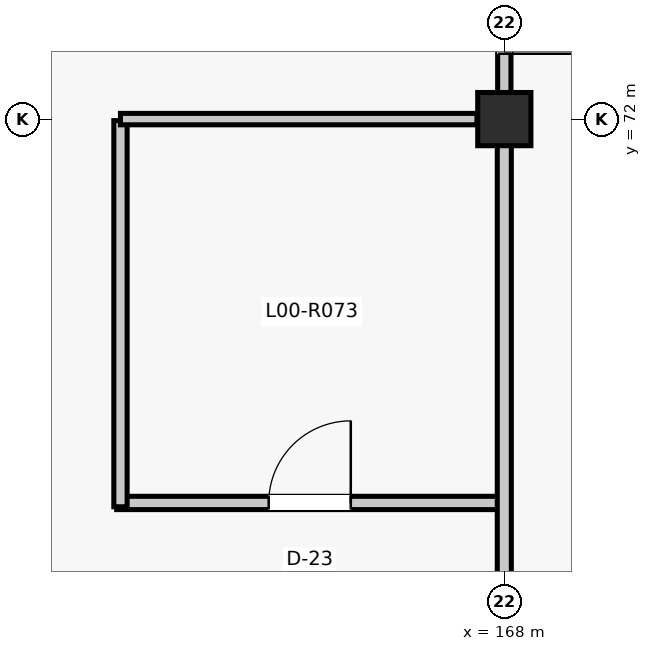
"""IFC4 building model, lengths in metres.
Left out: names, types, materials, properties, quantities, classifications, styles, units other than length and angle.
Written with IfcOpenShell. Run it as: python <this file> out.ifc"""

import sys

from ifc_helpers import new_model, si_unit, direction, frame, frame_2d, origin, origin_2d, place, context, subcontext, project, spatial, rectangle, extrude, element, fill, save


model = new_model("IFC4")
c1 = context("Model", 3, precision=1e-05, world=origin(), true_north=direction((0.0, 1.0)))
c2 = subcontext(c1, "Body", "Model", "MODEL_VIEW")
j1 = project(units=[si_unit("LENGTHUNIT", "METRE"), si_unit("PLANEANGLEUNIT", "RADIAN")], contexts=[c1])
p1 = place(None, origin())
s1 = spatial("IfcSite", under=j1, at=p1, CompositionType="ELEMENT")
p2 = place(p1, origin())
s2 = spatial("IfcBuilding", under=s1, at=p2, CompositionType="ELEMENT")
p3 = place(p2, origin())
s3 = spatial("IfcBuildingStorey", under=s2, at=p3, CompositionType="ELEMENT", Elevation=0.0)
p4 = place(p3, frame((168.0, 72.0, 0.0), z_axis=(0.0, 0.0, 1.0), x_axis=(1.0, 0.0, 0.0)))
e1 = element("IfcColumn", 1, at=p4, inside=s3, PredefinedType="COLUMN", context=c2, shape_type="SweptSolid", body=[
    extrude(rectangle(XDim=0.7, YDim=0.7, at=origin_2d()), origin(), (0.0, 0.0, 1.0), 5.28),
])
p5 = place(p3, frame((162.9, 66.95, 0.0), z_axis=(0.0, 0.0, 1.0), x_axis=(1.0, 0.0, 0.0)))
e2 = element("IfcWall", 2, at=p5, inside=s3, PredefinedType="PARTITIONING", context=c2, shape_type="SweptSolid", body=[
    extrude(rectangle(XDim=5.08, YDim=0.175, at=frame_2d((2.54, 0.0))), origin(), (0.0, 0.0, 1.0), 4.412),
])
p6 = place(p5, frame((2.0, 0.0, 0.0)))
e3 = element("IfcOpeningElement", 3, at=p6, cuts=e2, PredefinedType="OPENING", context=c2, shape_type="SweptSolid", body=[
    extrude(rectangle(XDim=1.08, YDim=2.2, at=frame_2d((0.54, 1.1))), frame((0.0, 0.097, 0.0), z_axis=(0.0, -1.0, 0.0), x_axis=(1.0, 0.0, 0.0)), (0.0, 0.0, 1.0), 0.195),
])
p7 = place(p3, frame((162.95, 66.9, 0.0), z_axis=(0.0, 0.0, 1.0), x_axis=(0.0, 1.0, 0.0)))
e4 = element("IfcWall", 4, at=p7, inside=s3, PredefinedType="PARTITIONING", context=c2, shape_type="SweptSolid", body=[
    extrude(rectangle(XDim=5.08, YDim=0.175, at=frame_2d((2.54, 0.0))), origin(), (0.0, 0.0, 1.0), 4.408),
])
p8 = place(p3, frame((162.95, 72.0, 0.0), z_axis=(0.0, 0.0, 1.0), x_axis=(1.0, 0.0, 0.0)))
e5 = element("IfcWall", 5, at=p8, inside=s3, PredefinedType="PARTITIONING", context=c2, shape_type="SweptSolid", body=[
    extrude(rectangle(XDim=4.69, YDim=0.15, at=frame_2d((2.345, 0.0))), origin(), (0.0, 0.0, 1.0), 4.408),
])
p9 = place(p3, frame((168.0, 64.34, 0.0), z_axis=(0.0, 0.0, 1.0), x_axis=(0.0, 1.0, 0.0)))
e6 = element("IfcWall", 6, at=p9, inside=s3, PredefinedType="PARTITIONING", context=c2, shape_type="SweptSolid", body=[
    extrude(rectangle(XDim=7.32, YDim=0.185, at=frame_2d((3.66, 0.0))), origin(), (0.0, 0.0, 1.0), 4.412),
])
p10 = place(p9, frame((0.52, 0.0, 0.0)))
e7 = element("IfcOpeningElement", 7, at=p10, cuts=e6, PredefinedType="OPENING", context=c2, shape_type="SweptSolid", body=[
    extrude(rectangle(XDim=0.94, YDim=2.12, at=frame_2d((0.47, 1.06))), frame((0.0, 0.103, 0.0), z_axis=(0.0, -1.0, 0.0), x_axis=(1.0, 0.0, 0.0)), (0.0, 0.0, 1.0), 0.205),
])
p11 = place(p3, frame((168.0, 72.34, 0.0), z_axis=(0.0, 0.0, 1.0), x_axis=(0.0, 1.0, 0.0)))
e8 = element("IfcWall", 8, at=p11, inside=s3, PredefinedType="PARTITIONING", context=c2, shape_type="SweptSolid", body=[
    extrude(rectangle(XDim=7.295, YDim=0.175, at=frame_2d((3.647, 0.0))), origin(), (0.0, 0.0, 1.0), 4.404),
])
p12 = place(p11, frame((0.52, 0.0, 0.0)))
e9 = element("IfcOpeningElement", 9, at=p12, cuts=e8, PredefinedType="OPENING", context=c2, shape_type="SweptSolid", body=[
    extrude(rectangle(XDim=0.94, YDim=2.12, at=frame_2d((0.47, 1.06))), frame((0.0, 0.097, 0.0), z_axis=(0.0, -1.0, 0.0), x_axis=(1.0, 0.0, 0.0)), (0.0, 0.0, 1.0), 0.195),
])
p13 = place(p6, origin())
e10 = element("IfcDoor", 10, at=p13, inside=s3, OperationType="SINGLE_SWING_RIGHT", PredefinedType="DOOR", context=c2, shape_type="SweptSolid", body=[
    extrude(rectangle(XDim=1.08, YDim=2.2, at=frame_2d((0.54, 1.1))), frame((0.0, 0.025, 0.0), z_axis=(0.0, -1.0, 0.0), x_axis=(1.0, 0.0, 0.0)), (0.0, 0.0, 1.0), 0.05),
])
fill(e3, e10)
p14 = place(p12, frame((0.94, 0.0, 0.0), z_axis=(0.0, 0.0, 1.0), x_axis=(-1.0, 0.0, 0.0)))
e11 = element("IfcDoor", 11, at=p14, inside=s3, OperationType="SINGLE_SWING_LEFT", PredefinedType="DOOR", context=c2, shape_type="SweptSolid", body=[
    extrude(rectangle(XDim=0.94, YDim=2.12, at=frame_2d((0.47, 1.06))), frame((0.0, 0.025, 0.0), z_axis=(0.0, -1.0, 0.0), x_axis=(1.0, 0.0, 0.0)), (0.0, 0.0, 1.0), 0.05),
])
fill(e9, e11)
save(model, sys.argv[1])
